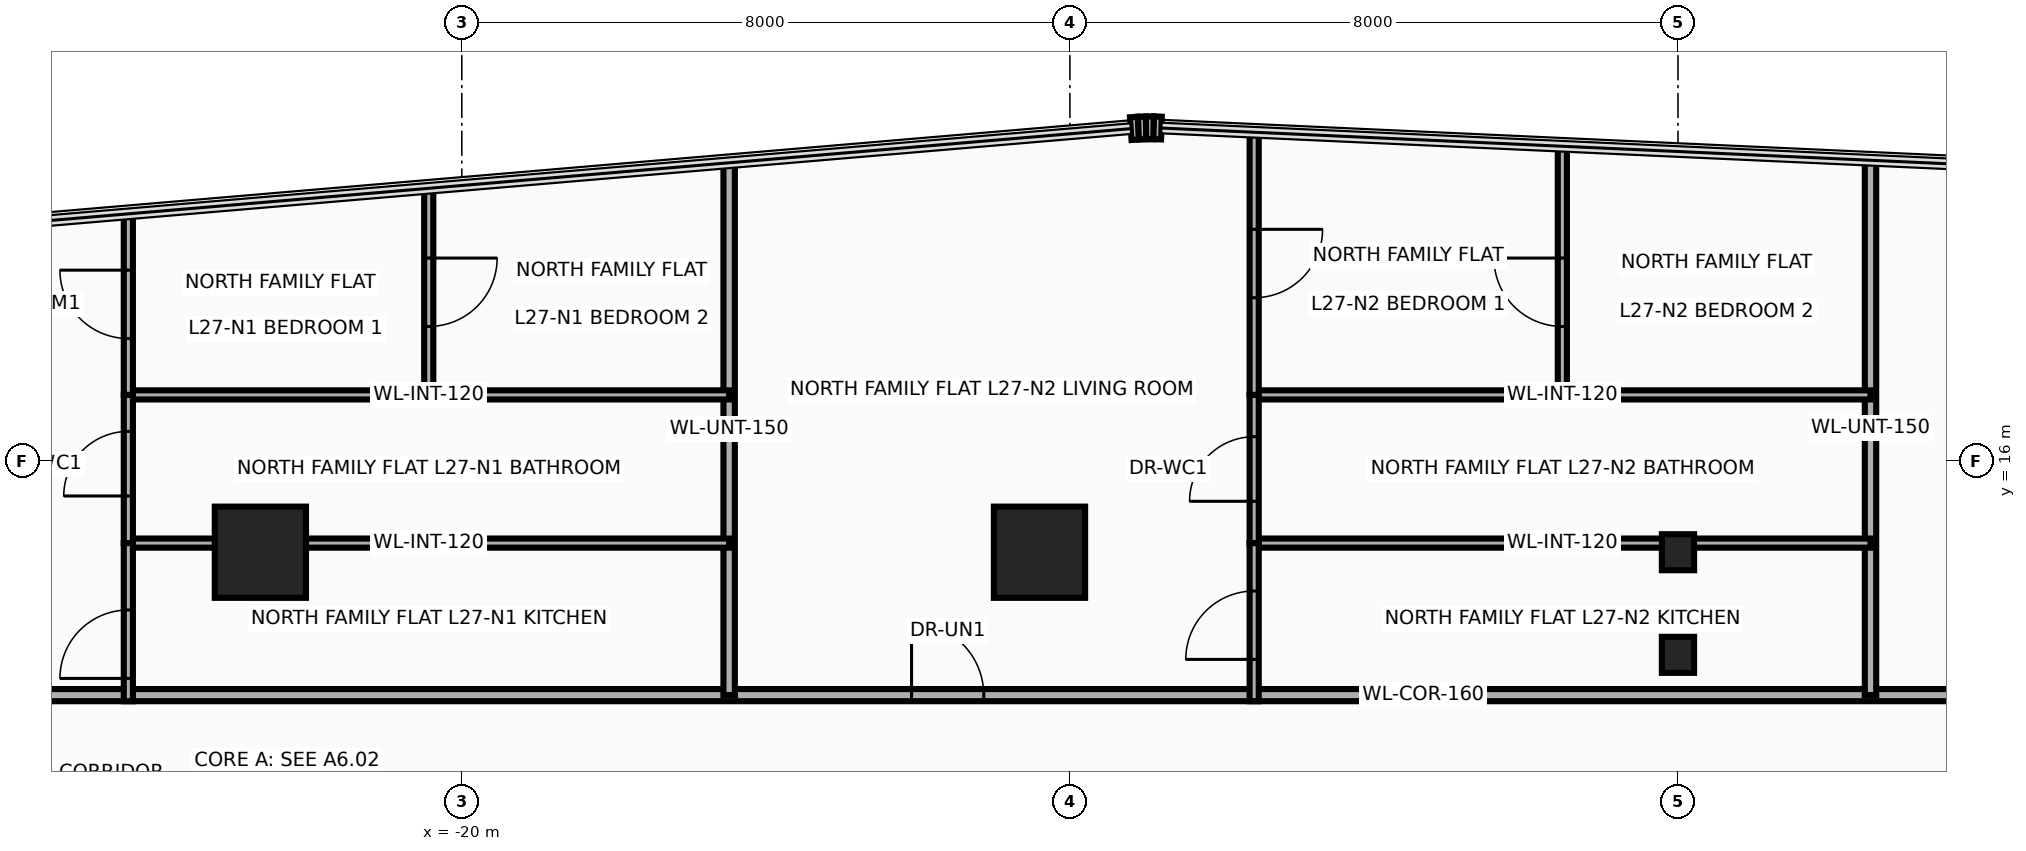
"""IFC4 building model, lengths in metres.
Left out: names, types, materials, properties, quantities, classifications, styles, units other than length and angle.
Written with IfcOpenShell. Run it as: python <this file> out.ifc"""

import sys

from ifc_helpers import new_model, si_unit, direction, frame, frame_2d, origin, origin_2d, place, context, subcontext, project, spatial, rectangle, i_section, extrude, source, transform, mapped, element, fill, save


model = new_model("IFC4")
c1 = context("Model", 3, precision=1e-05, world=origin(), true_north=direction((0.0, 1.0)))
c2 = subcontext(c1, "Body", "Model", "MODEL_VIEW")
j1 = project(units=[si_unit("LENGTHUNIT", "METRE"), si_unit("PLANEANGLEUNIT", "RADIAN")], contexts=[c1])
p1 = place(None, origin())
s1 = spatial("IfcSite", under=j1, at=p1, CompositionType="ELEMENT")
p2 = place(p1, origin())
s2 = spatial("IfcBuilding", under=s1, at=p2, CompositionType="ELEMENT")
p3 = place(p2, frame((0.0, 0.0, 109.4)))
s3 = spatial("IfcBuildingStorey", under=s2, at=p3, CompositionType="ELEMENT", Elevation=109.4)
m1 = source(origin(), c2, "Body", "SweptSolid", [
    extrude(rectangle(XDim=1.2, YDim=1.2, at=origin_2d()), origin(), (0.0, 0.0, 1.0), 3.7),
])
for number, where, z_axis, x_axis in (
    (1, (-22.65, 14.8, 0.0), (0.0, 0.0, 1.0), (1.0, 0.0, 0.0)),
    (2, (-12.4, 14.8, 0.0), (0.0, 0.0, 1.0), (1.0, 0.0, 0.0)),
):
    element("IfcColumn", number, at=place(p3, frame(where, z_axis=z_axis, x_axis=x_axis)), inside=s3, PredefinedType="COLUMN", context=c2, shape_type="MappedRepresentation", body=[
        mapped(m1, transform((0.0, 0.0, 0.0), x_axis=(1.0, 0.0, 0.0), y_axis=(0.0, 1.0, 0.0), z_axis=(0.0, 0.0, 1.0), scale=1.0)),
    ])
m2 = source(origin(), c2, "Body", "SweptSolid", [
    extrude(i_section(OverallWidth=0.424, OverallDepth=0.474, WebThickness=0.048, FlangeThickness=0.077, at=origin_2d()), origin(), (0.0, 0.0, 1.0), 3.7),
])
for number, where, z_axis, x_axis in (
    (3, (-4.0, 13.45, 0.0), (0.0, 0.0, 1.0), (1.0, 0.0, 0.0)),
    (4, (-4.0, 14.8, 0.0), (0.0, 0.0, 1.0), (1.0, 0.0, 0.0)),
):
    element("IfcColumn", number, at=place(p3, frame(where, z_axis=z_axis, x_axis=x_axis)), inside=s3, PredefinedType="COLUMN", context=c2, shape_type="MappedRepresentation", body=[
        mapped(m2, transform((0.0, 0.0, 0.0), x_axis=(1.0, 0.0, 0.0), y_axis=(0.0, 1.0, 0.0), z_axis=(0.0, 0.0, 1.0), scale=1.0)),
    ])
p4 = place(p3, frame((-11.199, 20.373, 0.0), z_axis=(0.0, 0.0, 1.0), x_axis=(0.997567332166, 0.069709524416, 0.0)))
e5 = element("IfcWall", 5, at=p4, inside=s3, PredefinedType="SOLIDWALL", context=c2, shape_type="SweptSolid", body=[
    extrude(rectangle(XDim=0.102, YDim=0.3, at=frame_2d((0.051, 0.0))), origin(), (0.0, 0.0, 1.0), 3.46),
])
p5 = place(p3, frame((-11.098, 20.38, 0.0), z_axis=(0.0, 0.0, 1.0), x_axis=(0.999334672785, 0.03647206835, 0.0)))
e6 = element("IfcWall", 6, at=p5, inside=s3, PredefinedType="SOLIDWALL", context=c2, shape_type="SweptSolid", body=[
    extrude(rectangle(XDim=0.1, YDim=0.3, at=frame_2d((0.05, 0.0))), origin(), (0.0, 0.0, 1.0), 3.46),
])
p6 = place(p3, frame((-10.998, 20.383, 0.0), z_axis=(0.0, 0.0, 1.0), x_axis=(0.999997054401, 0.002427177317, 0.0)))
e7 = element("IfcWall", 7, at=p6, inside=s3, PredefinedType="SOLIDWALL", context=c2, shape_type="SweptSolid", body=[
    extrude(rectangle(XDim=0.101, YDim=0.3, at=frame_2d((0.05, 0.0))), origin(), (0.0, 0.0, 1.0), 3.46),
])
p7 = place(p3, frame((-10.897, 20.384, 0.0), z_axis=(0.0, 0.0, 1.0), x_axis=(0.999584209171, -0.02883415988, 0.0)))
e8 = element("IfcWall", 8, at=p7, inside=s3, PredefinedType="SOLIDWALL", context=c2, shape_type="SweptSolid", body=[
    extrude(rectangle(XDim=0.102, YDim=0.3, at=frame_2d((0.051, 0.0))), origin(), (0.0, 0.0, 1.0), 3.46),
])
p8 = place(p3, frame((-28.25, 12.92, 0.0), z_axis=(0.0, 0.0, 1.0), x_axis=(1.0, 0.0, 0.0)))
e9 = element("IfcWall", 9, at=p8, inside=s3, PredefinedType="PARTITIONING", context=c2, shape_type="SweptSolid", body=[
    extrude(rectangle(XDim=41.8, YDim=0.16, at=frame_2d((20.9, 0.0))), origin(), (0.0, 0.0, 1.0), 2.666),
])
p9 = place(p8, frame((1.456, 0.0, 0.0)))
e10 = element("IfcOpeningElement", 10, at=p9, cuts=e9, PredefinedType="OPENING", context=c2, shape_type="SweptSolid", body=[
    extrude(rectangle(XDim=0.95, YDim=2.15, at=frame_2d((0.475, 1.075))), frame((0.0, 0.095, 0.0), z_axis=(0.0, -1.0, 0.0), x_axis=(1.0, 0.0, 0.0)), (0.0, 0.0, 1.0), 0.19),
])
p10 = place(p8, frame((14.167, 0.0, 0.0)))
e11 = element("IfcOpeningElement", 11, at=p10, cuts=e9, PredefinedType="OPENING", context=c2, shape_type="SweptSolid", body=[
    extrude(rectangle(XDim=0.95, YDim=2.15, at=frame_2d((0.475, 1.075))), frame((0.0, 0.095, 0.0), z_axis=(0.0, -1.0, 0.0), x_axis=(1.0, 0.0, 0.0)), (0.0, 0.0, 1.0), 0.19),
])
p11 = place(p8, frame((30.587, 0.0, 0.0)))
e12 = element("IfcOpeningElement", 12, at=p11, cuts=e9, PredefinedType="OPENING", context=c2, shape_type="SweptSolid", body=[
    extrude(rectangle(XDim=0.95, YDim=2.15, at=frame_2d((0.475, 1.075))), frame((0.0, 0.095, 0.0), z_axis=(0.0, -1.0, 0.0), x_axis=(1.0, 0.0, 0.0)), (0.0, 0.0, 1.0), 0.19),
])
p12 = place(p3, frame((-16.483, 12.92, 0.0), z_axis=(0.0, 0.0, 1.0), x_axis=(0.0, 1.0, 0.0)))
e13 = element("IfcWall", 13, at=p12, inside=s3, PredefinedType="PARTITIONING", context=c2, shape_type="SweptSolid", body=[
    extrude(rectangle(XDim=7.004, YDim=0.15, at=frame_2d((3.502, 0.0))), origin(), (0.0, 0.0, 1.0), 2.666),
])
p13 = place(p3, frame((-1.467, 12.92, 0.0), z_axis=(0.0, 0.0, 1.0), x_axis=(0.0, 1.0, 0.0)))
e14 = element("IfcWall", 14, at=p13, inside=s3, PredefinedType="PARTITIONING", context=c2, shape_type="SweptSolid", body=[
    extrude(rectangle(XDim=7.037, YDim=0.15, at=frame_2d((3.518, 0.0))), origin(), (0.0, 0.0, 1.0), 2.666),
])
p14 = place(p3, frame((-24.387, 14.92, 0.0), z_axis=(0.0, 0.0, 1.0), x_axis=(1.0, 0.0, 0.0)))
e15 = element("IfcWall", 15, at=p14, inside=s3, PredefinedType="PARTITIONING", context=c2, shape_type="SweptSolid", body=[
    extrude(rectangle(XDim=7.904, YDim=0.12, at=frame_2d((3.952, 0.0))), origin(), (0.0, 0.0, 1.0), 2.666),
])
p15 = place(p3, frame((-24.387, 16.87, 0.0), z_axis=(0.0, 0.0, 1.0), x_axis=(1.0, 0.0, 0.0)))
e16 = element("IfcWall", 16, at=p15, inside=s3, PredefinedType="PARTITIONING", context=c2, shape_type="SweptSolid", body=[
    extrude(rectangle(XDim=7.904, YDim=0.12, at=frame_2d((3.952, 0.0))), origin(), (0.0, 0.0, 1.0), 3.46),
])
p16 = place(p3, frame((-24.387, 14.92, 0.0), z_axis=(0.0, 0.0, 1.0), x_axis=(0.0, 1.0, 0.0)))
e17 = element("IfcWall", 17, at=p16, inside=s3, PredefinedType="PARTITIONING", context=c2, shape_type="SweptSolid", body=[
    extrude(rectangle(XDim=1.95, YDim=0.12, at=frame_2d((0.975, 0.0))), origin(), (0.0, 0.0, 1.0), 2.666),
])
p17 = place(p16, frame((0.62, 0.0, 0.0)))
e18 = element("IfcOpeningElement", 18, at=p17, cuts=e17, PredefinedType="OPENING", context=c2, shape_type="SweptSolid", body=[
    extrude(rectangle(XDim=0.85, YDim=2.1, at=frame_2d((0.425, 1.05))), frame((0.0, 0.075, 0.0), z_axis=(0.0, -1.0, 0.0), x_axis=(1.0, 0.0, 0.0)), (0.0, 0.0, 1.0), 0.15),
])
p18 = place(p3, frame((-24.387, 12.84, 0.0), z_axis=(0.0, 0.0, 1.0), x_axis=(0.0, 1.0, 0.0)))
e19 = element("IfcWall", 19, at=p18, inside=s3, PredefinedType="PARTITIONING", context=c2, shape_type="SweptSolid", body=[
    extrude(rectangle(XDim=2.08, YDim=0.12, at=frame_2d((1.04, 0.0))), origin(), (0.0, 0.0, 1.0), 2.666),
])
p19 = place(p18, frame((0.3, 0.0, 0.0)))
e20 = element("IfcOpeningElement", 20, at=p19, cuts=e19, PredefinedType="OPENING", context=c2, shape_type="SweptSolid", body=[
    extrude(rectangle(XDim=0.9, YDim=2.1, at=frame_2d((0.45, 1.05))), frame((0.0, 0.075, 0.0), z_axis=(0.0, -1.0, 0.0), x_axis=(1.0, 0.0, 0.0)), (0.0, 0.0, 1.0), 0.15),
])
p20 = place(p3, frame((-24.387, 16.87, 0.0), z_axis=(0.0, 0.0, 1.0), x_axis=(0.0, 1.0, 0.0)))
e21 = element("IfcWall", 21, at=p20, inside=s3, PredefinedType="PARTITIONING", context=c2, shape_type="SweptSolid", body=[
    extrude(rectangle(XDim=2.382, YDim=0.12, at=frame_2d((1.191, 0.0))), origin(), (0.0, 0.0, 1.0), 3.46),
])
p21 = place(p20, frame((0.741, 0.0, 0.0)))
e22 = element("IfcOpeningElement", 22, at=p21, cuts=e21, PredefinedType="OPENING", context=c2, shape_type="SweptSolid", body=[
    extrude(rectangle(XDim=0.9, YDim=2.1, at=frame_2d((0.45, 1.05))), frame((0.0, 0.075, 0.0), z_axis=(0.0, -1.0, 0.0), x_axis=(1.0, 0.0, 0.0)), (0.0, 0.0, 1.0), 0.15),
])
p22 = place(p3, frame((-20.435, 16.87, 0.0), z_axis=(0.0, 0.0, 1.0), x_axis=(0.0, 1.0, 0.0)))
e23 = element("IfcWall", 23, at=p22, inside=s3, PredefinedType="PARTITIONING", context=c2, shape_type="SweptSolid", body=[
    extrude(rectangle(XDim=2.718, YDim=0.12, at=frame_2d((1.359, 0.0))), origin(), (0.0, 0.0, 1.0), 3.46),
])
p23 = place(p22, frame((0.9, 0.0, 0.0)))
e24 = element("IfcOpeningElement", 24, at=p23, cuts=e23, PredefinedType="OPENING", context=c2, shape_type="SweptSolid", body=[
    extrude(rectangle(XDim=0.9, YDim=2.1, at=frame_2d((0.45, 1.05))), frame((0.0, 0.075, 0.0), z_axis=(0.0, -1.0, 0.0), x_axis=(1.0, 0.0, 0.0)), (0.0, 0.0, 1.0), 0.15),
])
p24 = place(p3, frame((-9.576, 14.92, 0.0), z_axis=(0.0, 0.0, 1.0), x_axis=(1.0, 0.0, 0.0)))
e25 = element("IfcWall", 25, at=p24, inside=s3, PredefinedType="PARTITIONING", context=c2, shape_type="SweptSolid", body=[
    extrude(rectangle(XDim=8.109, YDim=0.12, at=frame_2d((4.054, 0.0))), origin(), (0.0, 0.0, 1.0), 2.666),
])
p25 = place(p3, frame((-9.576, 16.87, 0.0), z_axis=(0.0, 0.0, 1.0), x_axis=(1.0, 0.0, 0.0)))
e26 = element("IfcWall", 26, at=p25, inside=s3, PredefinedType="PARTITIONING", context=c2, shape_type="SweptSolid", body=[
    extrude(rectangle(XDim=8.109, YDim=0.12, at=frame_2d((4.054, 0.0))), origin(), (0.0, 0.0, 1.0), 3.46),
])
p26 = place(p3, frame((-9.576, 14.92, 0.0), z_axis=(0.0, 0.0, 1.0), x_axis=(0.0, 1.0, 0.0)))
e27 = element("IfcWall", 27, at=p26, inside=s3, PredefinedType="PARTITIONING", context=c2, shape_type="SweptSolid", body=[
    extrude(rectangle(XDim=1.95, YDim=0.12, at=frame_2d((0.975, 0.0))), origin(), (0.0, 0.0, 1.0), 2.666),
])
p27 = place(p26, frame((0.55, 0.0, 0.0)))
e28 = element("IfcOpeningElement", 28, at=p27, cuts=e27, PredefinedType="OPENING", context=c2, shape_type="SweptSolid", body=[
    extrude(rectangle(XDim=0.85, YDim=2.1, at=frame_2d((0.425, 1.05))), frame((0.0, 0.075, 0.0), z_axis=(0.0, -1.0, 0.0), x_axis=(1.0, 0.0, 0.0)), (0.0, 0.0, 1.0), 0.15),
])
p28 = place(p3, frame((-9.576, 12.84, 0.0), z_axis=(0.0, 0.0, 1.0), x_axis=(0.0, 1.0, 0.0)))
e29 = element("IfcWall", 29, at=p28, inside=s3, PredefinedType="PARTITIONING", context=c2, shape_type="SweptSolid", body=[
    extrude(rectangle(XDim=2.08, YDim=0.12, at=frame_2d((1.04, 0.0))), origin(), (0.0, 0.0, 1.0), 2.666),
])
p29 = place(p28, frame((0.55, 0.0, 0.0)))
e30 = element("IfcOpeningElement", 30, at=p29, cuts=e29, PredefinedType="OPENING", context=c2, shape_type="SweptSolid", body=[
    extrude(rectangle(XDim=0.9, YDim=2.1, at=frame_2d((0.45, 1.05))), frame((0.0, 0.075, 0.0), z_axis=(0.0, -1.0, 0.0), x_axis=(1.0, 0.0, 0.0)), (0.0, 0.0, 1.0), 0.15),
])
p30 = place(p3, frame((-9.576, 16.87, 0.0), z_axis=(0.0, 0.0, 1.0), x_axis=(0.0, 1.0, 0.0)))
e31 = element("IfcWall", 31, at=p30, inside=s3, PredefinedType="PARTITIONING", context=c2, shape_type="SweptSolid", body=[
    extrude(rectangle(XDim=3.455, YDim=0.12, at=frame_2d((1.728, 0.0))), origin(), (0.0, 0.0, 1.0), 3.46),
])
p31 = place(p30, frame((1.278, 0.0, 0.0)))
e32 = element("IfcOpeningElement", 32, at=p31, cuts=e31, PredefinedType="OPENING", context=c2, shape_type="SweptSolid", body=[
    extrude(rectangle(XDim=0.9, YDim=2.1, at=frame_2d((0.45, 1.05))), frame((0.0, 0.075, 0.0), z_axis=(0.0, -1.0, 0.0), x_axis=(1.0, 0.0, 0.0)), (0.0, 0.0, 1.0), 0.15),
])
p32 = place(p3, frame((-5.521, 16.87, 0.0), z_axis=(0.0, 0.0, 1.0), x_axis=(0.0, 1.0, 0.0)))
e33 = element("IfcWall", 33, at=p32, inside=s3, PredefinedType="PARTITIONING", context=c2, shape_type="SweptSolid", body=[
    extrude(rectangle(XDim=3.271, YDim=0.12, at=frame_2d((1.635, 0.0))), origin(), (0.0, 0.0, 1.0), 3.46),
])
p33 = place(p32, frame((0.9, 0.0, 0.0)))
e34 = element("IfcOpeningElement", 34, at=p33, cuts=e33, PredefinedType="OPENING", context=c2, shape_type="SweptSolid", body=[
    extrude(rectangle(XDim=0.9, YDim=2.1, at=frame_2d((0.45, 1.05))), frame((0.0, 0.075, 0.0), z_axis=(0.0, -1.0, 0.0), x_axis=(1.0, 0.0, 0.0)), (0.0, 0.0, 1.0), 0.15),
])
p34 = place(p17, origin())
e35 = element("IfcDoor", 35, at=p34, inside=s3, OperationType="SINGLE_SWING_RIGHT", PredefinedType="DOOR", context=c2, shape_type="SweptSolid", body=[
    extrude(rectangle(XDim=0.85, YDim=2.1, at=frame_2d((0.425, 1.05))), frame((0.0, 0.025, 0.0), z_axis=(0.0, -1.0, 0.0), x_axis=(1.0, 0.0, 0.0)), (0.0, 0.0, 1.0), 0.05),
])
fill(e18, e35)
p35 = place(p19, origin())
e36 = element("IfcDoor", 36, at=p35, inside=s3, OperationType="SINGLE_SWING_LEFT", PredefinedType="DOOR", context=c2, shape_type="SweptSolid", body=[
    extrude(rectangle(XDim=0.9, YDim=2.1, at=frame_2d((0.45, 1.05))), frame((0.0, 0.025, 0.0), z_axis=(0.0, -1.0, 0.0), x_axis=(1.0, 0.0, 0.0)), (0.0, 0.0, 1.0), 0.05),
])
fill(e20, e36)
p36 = place(p21, origin())
e37 = element("IfcDoor", 37, at=p36, inside=s3, OperationType="SINGLE_SWING_RIGHT", PredefinedType="DOOR", context=c2, shape_type="SweptSolid", body=[
    extrude(rectangle(XDim=0.9, YDim=2.1, at=frame_2d((0.45, 1.05))), frame((0.0, 0.025, 0.0), z_axis=(0.0, -1.0, 0.0), x_axis=(1.0, 0.0, 0.0)), (0.0, 0.0, 1.0), 0.05),
])
fill(e22, e37)
p37 = place(p23, frame((0.9, 0.0, 0.0), z_axis=(0.0, 0.0, 1.0), x_axis=(-1.0, 0.0, 0.0)))
e38 = element("IfcDoor", 38, at=p37, inside=s3, OperationType="SINGLE_SWING_LEFT", PredefinedType="DOOR", context=c2, shape_type="SweptSolid", body=[
    extrude(rectangle(XDim=0.9, YDim=2.1, at=frame_2d((0.45, 1.05))), frame((0.0, 0.025, 0.0), z_axis=(0.0, -1.0, 0.0), x_axis=(1.0, 0.0, 0.0)), (0.0, 0.0, 1.0), 0.05),
])
fill(e24, e38)
p38 = place(p10, origin())
e39 = element("IfcDoor", 39, at=p38, inside=s3, OperationType="SINGLE_SWING_RIGHT", PredefinedType="DOOR", context=c2, shape_type="SweptSolid", body=[
    extrude(rectangle(XDim=0.95, YDim=2.15, at=frame_2d((0.475, 1.075))), frame((0.0, 0.025, 0.0), z_axis=(0.0, -1.0, 0.0), x_axis=(1.0, 0.0, 0.0)), (0.0, 0.0, 1.0), 0.05),
])
fill(e11, e39)
p39 = place(p27, origin())
e40 = element("IfcDoor", 40, at=p39, inside=s3, OperationType="SINGLE_SWING_LEFT", PredefinedType="DOOR", context=c2, shape_type="SweptSolid", body=[
    extrude(rectangle(XDim=0.85, YDim=2.1, at=frame_2d((0.425, 1.05))), frame((0.0, 0.025, 0.0), z_axis=(0.0, -1.0, 0.0), x_axis=(1.0, 0.0, 0.0)), (0.0, 0.0, 1.0), 0.05),
])
fill(e28, e40)
p40 = place(p29, origin())
e41 = element("IfcDoor", 41, at=p40, inside=s3, OperationType="SINGLE_SWING_RIGHT", PredefinedType="DOOR", context=c2, shape_type="SweptSolid", body=[
    extrude(rectangle(XDim=0.9, YDim=2.1, at=frame_2d((0.45, 1.05))), frame((0.0, 0.025, 0.0), z_axis=(0.0, -1.0, 0.0), x_axis=(1.0, 0.0, 0.0)), (0.0, 0.0, 1.0), 0.05),
])
fill(e30, e41)
p41 = place(p31, frame((0.9, 0.0, 0.0), z_axis=(0.0, 0.0, 1.0), x_axis=(-1.0, 0.0, 0.0)))
e42 = element("IfcDoor", 42, at=p41, inside=s3, OperationType="SINGLE_SWING_LEFT", PredefinedType="DOOR", context=c2, shape_type="SweptSolid", body=[
    extrude(rectangle(XDim=0.9, YDim=2.1, at=frame_2d((0.45, 1.05))), frame((0.0, 0.025, 0.0), z_axis=(0.0, -1.0, 0.0), x_axis=(1.0, 0.0, 0.0)), (0.0, 0.0, 1.0), 0.05),
])
fill(e32, e42)
p42 = place(p33, origin())
e43 = element("IfcDoor", 43, at=p42, inside=s3, OperationType="SINGLE_SWING_RIGHT", PredefinedType="DOOR", context=c2, shape_type="SweptSolid", body=[
    extrude(rectangle(XDim=0.9, YDim=2.1, at=frame_2d((0.45, 1.05))), frame((0.0, 0.025, 0.0), z_axis=(0.0, -1.0, 0.0), x_axis=(1.0, 0.0, 0.0)), (0.0, 0.0, 1.0), 0.05),
])
fill(e34, e43)
save(model, sys.argv[1])
